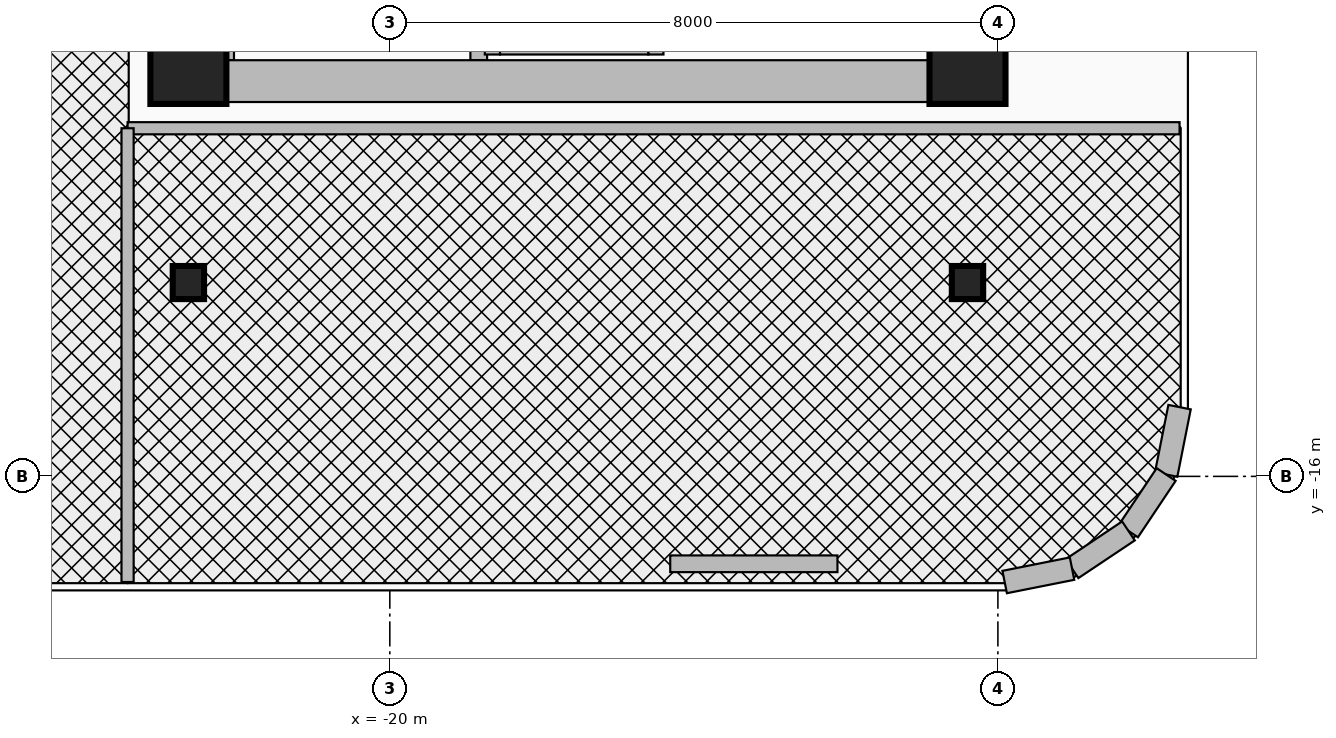
"""IFC4 building model, lengths in metres.
Left out: names, types, materials, properties, quantities, classifications, styles, units other than length and angle.
Written with IfcOpenShell. Run it as: python <this file> out.ifc"""

import sys

from ifc_helpers import new_model, si_unit, direction, frame, frame_2d, origin, origin_2d, place, context, subcontext, project, spatial, rectangle, i_section, extrude, source, transform, mapped, element, fill, save


model = new_model("IFC4")
c1 = context("Model", 3, precision=1e-05, world=origin(), true_north=direction((0.0, 1.0)))
c2 = subcontext(c1, "Body", "Model", "MODEL_VIEW")
j1 = project(units=[si_unit("LENGTHUNIT", "METRE"), si_unit("PLANEANGLEUNIT", "RADIAN")], contexts=[c1])
p1 = place(None, origin())
s1 = spatial("IfcSite", under=j1, at=p1, CompositionType="ELEMENT")
p2 = place(p1, origin())
s2 = spatial("IfcBuilding", under=s1, at=p2, CompositionType="ELEMENT")
p3 = place(p2, frame((0.0, 0.0, 180.5)))
s3 = spatial("IfcBuildingStorey", under=s2, at=p3, CompositionType="ELEMENT", Elevation=180.5)
for number, where, z_axis, x_axis in (
    (1, (-22.16, -10.525, 0.0), (0.0, 0.0, 1.0), (0.0, 1.0, 0.0)),
    (2, (-18.83, -10.525, 0.0), (0.0, 0.0, 1.0), (0.0, 1.0, 0.0)),
):
    element("IfcWall", number, at=place(p3, frame(where, z_axis=z_axis, x_axis=x_axis)), inside=s3, PredefinedType="SHEAR", context=c2, shape_type="SweptSolid", body=[
        extrude(rectangle(XDim=8.745, YDim=0.22, at=frame_2d((4.373, 0.0))), origin(), (0.0, 0.0, 1.0), 3.63),
    ])
p4 = place(p3, frame((-22.65, -11.075, 0.0), z_axis=(0.0, 0.0, 1.0), x_axis=(0.0, 1.0, 0.0)))
e3 = element("IfcWall", 3, at=p4, inside=s3, PredefinedType="SHEAR", context=c2, shape_type="SweptSolid", body=[
    extrude(rectangle(XDim=22.15, YDim=0.55, at=frame_2d((11.075, 0.0))), origin(), (0.0, 0.0, 1.0), 3.63),
])
p5 = place(p3, frame((-22.65, -10.8, 0.0), z_axis=(0.0, 0.0, 1.0), x_axis=(1.0, 0.0, 0.0)))
e4 = element("IfcWall", 4, at=p5, inside=s3, PredefinedType="SHEAR", context=c2, shape_type="SweptSolid", body=[
    extrude(rectangle(XDim=10.25, YDim=0.55, at=frame_2d((5.125, 0.0))), origin(), (0.0, 0.0, 1.0), 3.63),
])
m1 = source(origin(), c2, "Body", "SweptSolid", [
    extrude(rectangle(XDim=1.0, YDim=1.0, at=origin_2d()), origin(), (0.0, 0.0, 1.0), 3.95),
])
for number, where, z_axis, x_axis in (
    (5, (-22.65, -10.6, 0.0), (0.0, 0.0, 1.0), (1.0, 0.0, 0.0)),
    (6, (-12.4, -10.6, 0.0), (0.0, 0.0, 1.0), (1.0, 0.0, 0.0)),
):
    element("IfcColumn", number, at=place(p3, frame(where, z_axis=z_axis, x_axis=x_axis)), inside=s3, PredefinedType="COLUMN", context=c2, shape_type="MappedRepresentation", body=[
        mapped(m1, transform((0.0, 0.0, 0.0), x_axis=(1.0, 0.0, 0.0), y_axis=(0.0, 1.0, 0.0), z_axis=(0.0, 0.0, 1.0), scale=1.0)),
    ])
m2 = source(origin(), c2, "Body", "SweptSolid", [
    extrude(i_section(OverallWidth=0.412, OverallDepth=0.435, WebThickness=0.036, FlangeThickness=0.057, at=origin_2d()), origin(), (0.0, 0.0, 1.0), 3.95),
])
for number, where, z_axis, x_axis in (
    (7, (-22.65, -13.45, 0.0), (0.0, 0.0, 1.0), (1.0, 0.0, 0.0)),
    (8, (-12.4, -13.45, 0.0), (0.0, 0.0, 1.0), (1.0, 0.0, 0.0)),
):
    element("IfcColumn", number, at=place(p3, frame(where, z_axis=z_axis, x_axis=x_axis)), inside=s3, PredefinedType="COLUMN", context=c2, shape_type="MappedRepresentation", body=[
        mapped(m2, transform((0.0, 0.0, 0.0), x_axis=(1.0, 0.0, 0.0), y_axis=(0.0, 1.0, 0.0), z_axis=(0.0, 0.0, 1.0), scale=1.0)),
    ])
p6 = place(p3, frame((-9.61, -15.089, 0.0), z_axis=(0.0, 0.0, 1.0), x_axis=(-0.195025152871, -0.980798241101, 0.0)))
e9 = element("IfcWall", 9, at=p6, inside=s3, PredefinedType="SOLIDWALL", context=c2, shape_type="SweptSolid", body=[
    extrude(rectangle(XDim=0.904, YDim=0.3, at=frame_2d((0.452, 0.0))), origin(), (0.0, 0.0, 1.0), 3.63),
])
for number, where, z_axis, x_axis in (
    (10, (-9.786, -15.976, 0.0), (0.0, 0.0, 1.0), (-0.556, -0.832, 0.0)),
    (11, (-10.282, -16.718, 0.0), (0.0, 0.0, 1.0), (-0.832, -0.556, 0.0)),
):
    element("IfcWall", number, at=place(p3, frame(where, z_axis=z_axis, x_axis=x_axis)), inside=s3, PredefinedType="SOLIDWALL", context=c2, shape_type="SweptSolid", body=[
        extrude(rectangle(XDim=0.893, YDim=0.3, at=frame_2d((0.446, 0.0))), origin(), (0.0, 0.0, 1.0), 3.63),
    ])
p7 = place(p3, frame((-11.024, -17.214, 0.0), z_axis=(0.0, 0.0, 1.0), x_axis=(-0.980798241101, -0.195025152871, 0.0)))
e12 = element("IfcWall", 12, at=p7, inside=s3, PredefinedType="SOLIDWALL", context=c2, shape_type="SweptSolid", body=[
    extrude(rectangle(XDim=0.904, YDim=0.3, at=frame_2d((0.452, 0.0))), origin(), (0.0, 0.0, 1.0), 3.63),
])
p8 = place(p3, frame((-14.111, -17.15, 0.0), z_axis=(0.0, 0.0, 1.0), x_axis=(-1.0, 0.0, 0.0)))
e13 = element("IfcWall", 13, at=p8, inside=s3, PredefinedType="SOLIDWALL", context=c2, shape_type="SweptSolid", body=[
    extrude(rectangle(XDim=2.2, YDim=0.22, at=frame_2d((1.1, 0.0))), origin(), (0.0, 0.0, 1.0), 3.63),
])
p9 = place(p8, frame((0.65, 0.0, 0.95)))
e14 = element("IfcOpeningElement", 14, at=p9, cuts=e13, PredefinedType="OPENING", context=c2, shape_type="SweptSolid", body=[
    extrude(rectangle(XDim=0.9, YDim=1.3, at=frame_2d((0.45, 0.65))), frame((0.0, 0.125, 0.0), z_axis=(0.0, -1.0, 0.0), x_axis=(1.0, 0.0, 0.0)), (0.0, 0.0, 1.0), 0.25),
])
for number, where, z_axis, x_axis in (
    (15, (-18.65, -10.45, 0.0), (0.0, 0.0, 1.0), (0.0, 1.0, 0.0)),
    (16, (-16.5, -10.45, 0.0), (0.0, 0.0, 1.0), (0.0, 1.0, 0.0)),
):
    element("IfcWall", number, at=place(p3, frame(where, z_axis=z_axis, x_axis=x_axis)), inside=s3, PredefinedType="MOVABLE", context=c2, shape_type="SweptSolid", body=[
        extrude(rectangle(XDim=2.35, YDim=0.2, at=frame_2d((1.175, 0.0))), origin(), (0.0, 0.0, 1.0), 2.665),
    ])
p10 = place(p3, frame((-18.55, -10.35, 0.0), z_axis=(0.0, 0.0, 1.0), x_axis=(1.0, 0.0, 0.0)))
e17 = element("IfcWall", 17, at=p10, inside=s3, PredefinedType="MOVABLE", context=c2, shape_type="SweptSolid", body=[
    extrude(rectangle(XDim=1.95, YDim=0.2, at=frame_2d((0.975, 0.0))), origin(), (0.0, 0.0, 1.0), 2.665),
])
p11 = place(p3, frame((-23.45, -11.42, 0.0), z_axis=(0.0, 0.0, 1.0), x_axis=(1.0, 0.0, 0.0)))
e18 = element("IfcWall", 18, at=p11, inside=s3, PredefinedType="PARTITIONING", context=c2, shape_type="SweptSolid", body=[
    extrude(rectangle(XDim=13.84, YDim=0.16, at=frame_2d((6.92, 0.0))), origin(), (0.0, 0.0, 1.0), 3.004),
])
p12 = place(p3, frame((-23.45, -17.39, 0.0), z_axis=(0.0, 0.0, 1.0), x_axis=(0.0, 1.0, 0.0)))
e19 = element("IfcWall", 19, at=p12, inside=s3, PredefinedType="PARTITIONING", context=c2, shape_type="SweptSolid", body=[
    extrude(rectangle(XDim=5.97, YDim=0.16, at=frame_2d((2.985, 0.0))), origin(), (0.0, 0.0, 1.0), 3.63),
])
p13 = place(p12, frame((2.535, 0.0, 0.0)))
e20 = element("IfcOpeningElement", 20, at=p13, cuts=e19, PredefinedType="OPENING", context=c2, shape_type="SweptSolid", body=[
    extrude(rectangle(XDim=0.9, YDim=2.1, at=frame_2d((0.45, 1.05))), frame((0.0, 0.095, 0.0), z_axis=(0.0, -1.0, 0.0), x_axis=(1.0, 0.0, 0.0)), (0.0, 0.0, 1.0), 0.19),
])
p14 = place(p9, origin())
e21 = element("IfcWindow", 21, at=p14, inside=s3, PartitioningType="SINGLE_PANEL", PredefinedType="WINDOW", context=c2, shape_type="SweptSolid", body=[
    extrude(rectangle(XDim=0.9, YDim=1.3, at=frame_2d((0.45, 0.65))), frame((0.0, 0.03, 0.0), z_axis=(0.0, -1.0, 0.0), x_axis=(1.0, 0.0, 0.0)), (0.0, 0.0, 1.0), 0.06),
])
fill(e14, e21)
p15 = place(p13, origin())
e22 = element("IfcDoor", 22, at=p15, inside=s3, OperationType="SINGLE_SWING_RIGHT", PredefinedType="DOOR", context=c2, shape_type="SweptSolid", body=[
    extrude(rectangle(XDim=0.9, YDim=2.1, at=frame_2d((0.45, 1.05))), frame((0.0, 0.025, 0.0), z_axis=(0.0, -1.0, 0.0), x_axis=(1.0, 0.0, 0.0)), (0.0, 0.0, 1.0), 0.05),
])
fill(e20, e22)
save(model, sys.argv[1])
